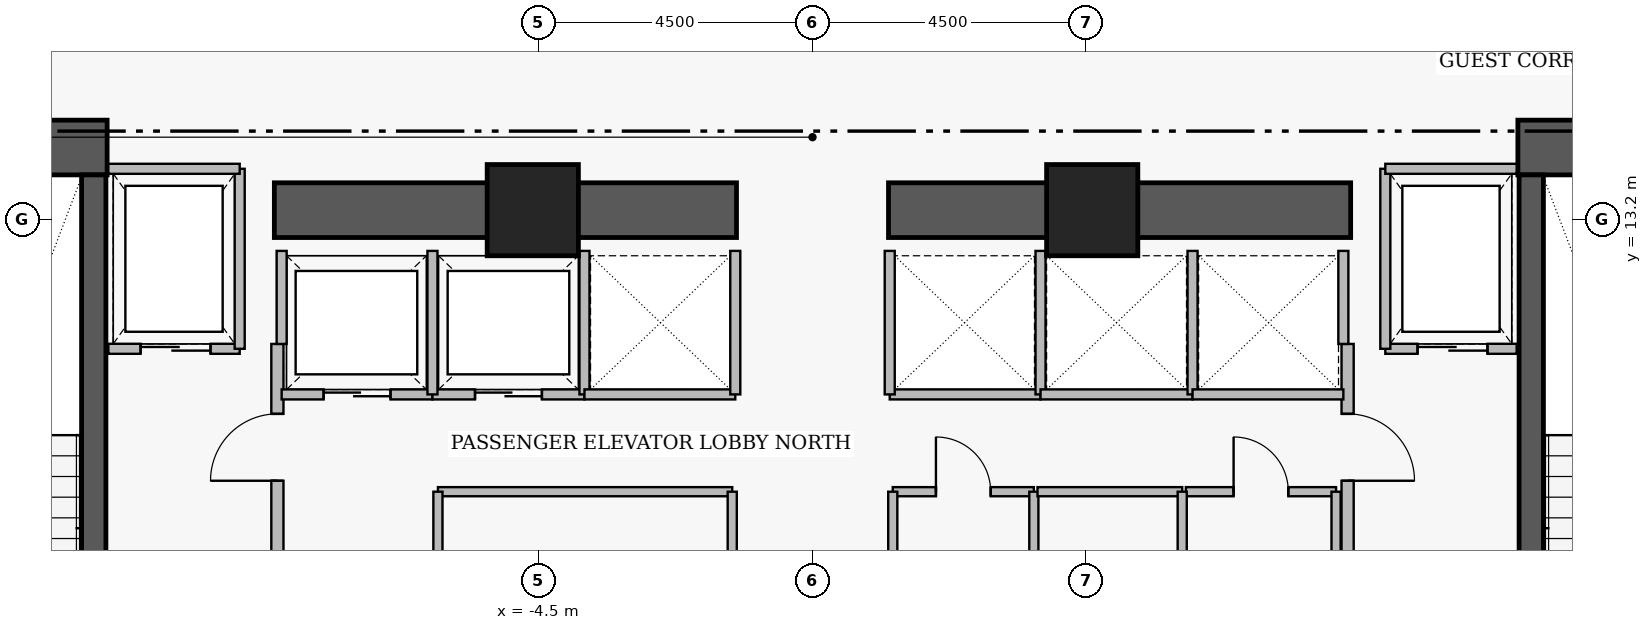
"""IFC4 building model, lengths in metres.
Left out: names, types, materials, properties, quantities, classifications, styles, units other than length and angle.
Written with IfcOpenShell. Run it as: python <this file> out.ifc"""

import sys

from ifc_helpers import new_model, si_unit, direction, frame, frame_2d, origin, origin_2d, place, context, subcontext, project, spatial, rectangle, extrude, element, fill, save


model = new_model("IFC4")
c1 = context("Model", 3, precision=1e-05, world=origin(), true_north=direction((0.0, 1.0)))
c2 = subcontext(c1, "Body", "Model", "MODEL_VIEW")
j1 = project(units=[si_unit("LENGTHUNIT", "METRE"), si_unit("PLANEANGLEUNIT", "RADIAN")], contexts=[c1])
p1 = place(None, origin())
s1 = spatial("IfcSite", under=j1, at=p1, CompositionType="ELEMENT")
p2 = place(p1, origin())
s2 = spatial("IfcBuilding", under=s1, at=p2, CompositionType="ELEMENT")
p3 = place(p2, frame((0.0, 0.0, 38.55)))
s3 = spatial("IfcBuildingStorey", under=s2, at=p3, CompositionType="ELEMENT", Elevation=38.55)
for number, where, z_axis, x_axis in (
    (1, (-16.31, 14.38, 0.0), (0.0, 0.0, 1.0), (1.0, 0.0, 0.0)),
    (2, (11.6, 14.38, 0.0), (0.0, 0.0, 1.0), (1.0, 0.0, 0.0)),
):
    element("IfcWall", number, at=place(p3, frame(where, z_axis=z_axis, x_axis=x_axis)), inside=s3, PredefinedType="SHEAR", context=c2, shape_type="SweptSolid", body=[
        extrude(rectangle(XDim=4.71, YDim=0.9, at=frame_2d((2.355, 0.0))), origin(), (0.0, 0.0, 1.0), 3.46),
    ])
for number, where, z_axis, x_axis in (
    (3, (-8.85, 13.35, 0.0), (0.0, 0.0, 1.0), (1.0, 0.0, 0.0)),
    (4, (1.25, 13.35, 0.0), (0.0, 0.0, 1.0), (1.0, 0.0, 0.0)),
):
    element("IfcWall", number, at=place(p3, frame(where, z_axis=z_axis, x_axis=x_axis)), inside=s3, PredefinedType="SHEAR", context=c2, shape_type="SweptSolid", body=[
        extrude(rectangle(XDim=7.6, YDim=0.9, at=frame_2d((3.8, 0.0))), origin(), (0.0, 0.0, 1.0), 3.43),
    ])
p4 = place(p3, frame((-11.82, 4.97, 0.0), z_axis=(0.0, 0.0, 1.0), x_axis=(0.0, 1.0, 0.0)))
e5 = element("IfcWall", 5, at=p4, inside=s3, PredefinedType="SHEAR", context=c2, shape_type="SweptSolid", body=[
    extrude(rectangle(XDim=8.96, YDim=0.4, at=frame_2d((4.48, 0.0))), origin(), (0.0, 0.0, 1.0), 3.46),
])
p5 = place(p4, frame((0.31, 0.0, 0.0)))
e6 = element("IfcOpeningElement", 6, at=p5, cuts=e5, PredefinedType="OPENING", context=c2, shape_type="SweptSolid", body=[
    extrude(rectangle(XDim=1.12, YDim=2.22, at=frame_2d((0.56, 1.11))), frame((0.0, 0.21, 0.0), z_axis=(0.0, -1.0, 0.0), x_axis=(1.0, 0.0, 0.0)), (0.0, 0.0, 1.0), 0.42),
])
p6 = place(p3, frame((11.82, 13.93, 0.0), z_axis=(0.0, 0.0, 1.0), x_axis=(0.0, -1.0, 0.0)))
e7 = element("IfcWall", 7, at=p6, inside=s3, PredefinedType="SHEAR", context=c2, shape_type="SweptSolid", body=[
    extrude(rectangle(XDim=8.96, YDim=0.4, at=frame_2d((4.48, 0.0))), origin(), (0.0, 0.0, 1.0), 3.46),
])
p7 = place(p6, frame((7.53, 0.0, 0.0)))
e8 = element("IfcOpeningElement", 8, at=p7, cuts=e7, PredefinedType="OPENING", context=c2, shape_type="SweptSolid", body=[
    extrude(rectangle(XDim=1.12, YDim=2.22, at=frame_2d((0.56, 1.11))), frame((0.0, 0.21, 0.0), z_axis=(0.0, -1.0, 0.0), x_axis=(1.0, 0.0, 0.0)), (0.0, 0.0, 1.0), 0.42),
])
for number, where, z_axis, x_axis in (
    (9, (-4.6, 13.35, 0.0), (0.0, 0.0, 1.0), (1.0, 0.0, 0.0)),
    (10, (4.6, 13.35, 0.0), (0.0, 0.0, 1.0), (1.0, 0.0, 0.0)),
):
    element("IfcColumn", number, at=place(p3, frame(where, z_axis=z_axis, x_axis=x_axis)), inside=s3, PredefinedType="COLUMN", context=c2, shape_type="SweptSolid", body=[
        extrude(rectangle(XDim=1.5, YDim=1.5, at=origin_2d()), origin(), (0.0, 0.0, 1.0), 3.65),
    ])
p8 = place(p3, frame((-8.8, 5.05, 0.0), z_axis=(0.0, 0.0, 1.0), x_axis=(0.0, 1.0, 0.0)))
e11 = element("IfcWall", 11, at=p8, inside=s3, PredefinedType="PARTITIONING", context=c2, shape_type="SweptSolid", body=[
    extrude(rectangle(XDim=6.1, YDim=0.2, at=frame_2d((3.05, 0.0))), origin(), (0.0, 0.0, 1.0), 3.43),
])
p9 = place(p8, frame((0.25, 0.0, 0.0)))
e12 = element("IfcOpeningElement", 12, at=p9, cuts=e11, PredefinedType="OPENING", context=c2, shape_type="SweptSolid", body=[
    extrude(rectangle(XDim=1.1, YDim=2.2, at=frame_2d((0.55, 1.1))), frame((0.0, 0.11, 0.0), z_axis=(0.0, -1.0, 0.0), x_axis=(1.0, 0.0, 0.0)), (0.0, 0.0, 1.0), 0.22),
])
p10 = place(p8, frame((3.85, 0.0, 0.0)))
e13 = element("IfcOpeningElement", 13, at=p10, cuts=e11, PredefinedType="OPENING", context=c2, shape_type="SweptSolid", body=[
    extrude(rectangle(XDim=1.1, YDim=2.2, at=frame_2d((0.55, 1.1))), frame((0.0, 0.11, 0.0), z_axis=(0.0, -1.0, 0.0), x_axis=(1.0, 0.0, 0.0)), (0.0, 0.0, 1.0), 0.22),
])
p11 = place(p3, frame((8.8, 11.15, 0.0), z_axis=(0.0, 0.0, 1.0), x_axis=(0.0, -1.0, 0.0)))
e14 = element("IfcWall", 14, at=p11, inside=s3, PredefinedType="PARTITIONING", context=c2, shape_type="SweptSolid", body=[
    extrude(rectangle(XDim=6.1, YDim=0.2, at=frame_2d((3.05, 0.0))), origin(), (0.0, 0.0, 1.0), 3.43),
])
p12 = place(p11, frame((1.15, 0.0, 0.0)))
e15 = element("IfcOpeningElement", 15, at=p12, cuts=e14, PredefinedType="OPENING", context=c2, shape_type="SweptSolid", body=[
    extrude(rectangle(XDim=1.1, YDim=2.2, at=frame_2d((0.55, 1.1))), frame((0.0, 0.11, 0.0), z_axis=(0.0, -1.0, 0.0), x_axis=(1.0, 0.0, 0.0)), (0.0, 0.0, 1.0), 0.22),
])
p13 = place(p11, frame((4.75, 0.0, 0.0)))
e16 = element("IfcOpeningElement", 16, at=p13, cuts=e14, PredefinedType="OPENING", context=c2, shape_type="SweptSolid", body=[
    extrude(rectangle(XDim=1.1, YDim=2.2, at=frame_2d((0.55, 1.1))), frame((0.0, 0.11, 0.0), z_axis=(0.0, -1.0, 0.0), x_axis=(1.0, 0.0, 0.0)), (0.0, 0.0, 1.0), 0.22),
])
p14 = place(p3, frame((-11.58, 11.07, 0.0), z_axis=(0.0, 0.0, 1.0), x_axis=(1.0, 0.0, 0.0)))
e17 = element("IfcWall", 17, at=p14, inside=s3, PredefinedType="PARTITIONING", context=c2, shape_type="SweptSolid", body=[
    extrude(rectangle(XDim=2.16, YDim=0.165, at=frame_2d((1.08, 0.0))), origin(), (0.0, 0.0, 1.0), 3.43),
])
p15 = place(p14, frame((0.53, 0.0, 0.0)))
e18 = element("IfcOpeningElement", 18, at=p15, cuts=e17, PredefinedType="OPENING", context=c2, shape_type="SweptSolid", body=[
    extrude(rectangle(XDim=1.15, YDim=2.25, at=frame_2d((0.575, 1.125))), frame((0.0, 0.093, 0.0), z_axis=(0.0, -1.0, 0.0), x_axis=(1.0, 0.0, 0.0)), (0.0, 0.0, 1.0), 0.185),
])
p16 = place(p3, frame((9.42, 11.07, 0.0), z_axis=(0.0, 0.0, 1.0), x_axis=(1.0, 0.0, 0.0)))
e19 = element("IfcWall", 19, at=p16, inside=s3, PredefinedType="PARTITIONING", context=c2, shape_type="SweptSolid", body=[
    extrude(rectangle(XDim=2.16, YDim=0.165, at=frame_2d((1.08, 0.0))), origin(), (0.0, 0.0, 1.0), 3.43),
])
p17 = place(p16, frame((0.53, 0.0, 0.0)))
e20 = element("IfcOpeningElement", 20, at=p17, cuts=e19, PredefinedType="OPENING", context=c2, shape_type="SweptSolid", body=[
    extrude(rectangle(XDim=1.15, YDim=2.25, at=frame_2d((0.575, 1.125))), frame((0.0, 0.093, 0.0), z_axis=(0.0, -1.0, 0.0), x_axis=(1.0, 0.0, 0.0)), (0.0, 0.0, 1.0), 0.185),
])
p18 = place(p3, frame((-8.73, 10.32, 0.0), z_axis=(0.0, 0.0, 1.0), x_axis=(1.0, 0.0, 0.0)))
e21 = element("IfcWall", 21, at=p18, inside=s3, PredefinedType="PARTITIONING", context=c2, shape_type="SweptSolid", body=[
    extrude(rectangle(XDim=2.48, YDim=0.165, at=frame_2d((1.24, 0.0))), origin(), (0.0, 0.0, 1.0), 3.43),
])
p19 = place(p18, frame((0.69, 0.0, 0.0)))
e22 = element("IfcOpeningElement", 22, at=p19, cuts=e21, PredefinedType="OPENING", context=c2, shape_type="SweptSolid", body=[
    extrude(rectangle(XDim=1.1, YDim=2.25, at=frame_2d((0.55, 1.125))), frame((0.0, 0.093, 0.0), z_axis=(0.0, -1.0, 0.0), x_axis=(1.0, 0.0, 0.0)), (0.0, 0.0, 1.0), 0.185),
])
p20 = place(p3, frame((-6.25, 10.32, 0.0), z_axis=(0.0, 0.0, 1.0), x_axis=(1.0, 0.0, 0.0)))
e23 = element("IfcWall", 23, at=p20, inside=s3, PredefinedType="PARTITIONING", context=c2, shape_type="SweptSolid", body=[
    extrude(rectangle(XDim=2.5, YDim=0.165, at=frame_2d((1.25, 0.0))), origin(), (0.0, 0.0, 1.0), 3.43),
])
p21 = place(p20, frame((0.7, 0.0, 0.0)))
e24 = element("IfcOpeningElement", 24, at=p21, cuts=e23, PredefinedType="OPENING", context=c2, shape_type="SweptSolid", body=[
    extrude(rectangle(XDim=1.1, YDim=2.25, at=frame_2d((0.55, 1.125))), frame((0.0, 0.093, 0.0), z_axis=(0.0, -1.0, 0.0), x_axis=(1.0, 0.0, 0.0)), (0.0, 0.0, 1.0), 0.185),
])
p22 = place(p3, frame((1.32, 8.72, 0.0), z_axis=(0.0, 0.0, 1.0), x_axis=(1.0, 0.0, 0.0)))
e25 = element("IfcWall", 25, at=p22, inside=s3, PredefinedType="PARTITIONING", context=c2, shape_type="SweptSolid", body=[
    extrude(rectangle(XDim=2.32, YDim=0.15, at=frame_2d((1.16, 0.0))), origin(), (0.0, 0.0, 1.0), 3.43),
])
p23 = place(p22, frame((0.71, 0.0, 0.0)))
e26 = element("IfcOpeningElement", 26, at=p23, cuts=e25, PredefinedType="OPENING", context=c2, shape_type="SweptSolid", body=[
    extrude(rectangle(XDim=0.9, YDim=2.15, at=frame_2d((0.45, 1.075))), frame((0.0, 0.085, 0.0), z_axis=(0.0, -1.0, 0.0), x_axis=(1.0, 0.0, 0.0)), (0.0, 0.0, 1.0), 0.17),
])
p24 = place(p3, frame((6.14, 8.72, 0.0), z_axis=(0.0, 0.0, 1.0), x_axis=(1.0, 0.0, 0.0)))
e27 = element("IfcWall", 27, at=p24, inside=s3, PredefinedType="PARTITIONING", context=c2, shape_type="SweptSolid", body=[
    extrude(rectangle(XDim=2.47, YDim=0.15, at=frame_2d((1.235, 0.0))), origin(), (0.0, 0.0, 1.0), 3.43),
])
p25 = place(p24, frame((0.785, 0.0, 0.0)))
e28 = element("IfcOpeningElement", 28, at=p25, cuts=e27, PredefinedType="OPENING", context=c2, shape_type="SweptSolid", body=[
    extrude(rectangle(XDim=0.9, YDim=2.15, at=frame_2d((0.45, 1.075))), frame((0.0, 0.085, 0.0), z_axis=(0.0, -1.0, 0.0), x_axis=(1.0, 0.0, 0.0)), (0.0, 0.0, 1.0), 0.17),
])
p26 = place(p3, frame((-9.42, 11.07, 0.0), z_axis=(0.0, 0.0, 1.0), x_axis=(0.0, 1.0, 0.0)))
e29 = element("IfcWall", 29, at=p26, inside=s3, PredefinedType="PARTITIONING", context=c2, shape_type="SweptSolid", body=[
    extrude(rectangle(XDim=2.96, YDim=0.165, at=frame_2d((1.48, 0.0))), origin(), (0.0, 0.0, 1.0), 3.43),
])
p27 = place(p3, frame((-11.58, 14.03, 0.0), z_axis=(0.0, 0.0, 1.0), x_axis=(1.0, 0.0, 0.0)))
e30 = element("IfcWall", 30, at=p27, inside=s3, PredefinedType="PARTITIONING", context=c2, shape_type="SweptSolid", body=[
    extrude(rectangle(XDim=2.16, YDim=0.165, at=frame_2d((1.08, 0.0))), origin(), (0.0, 0.0, 1.0), 3.43),
])
p28 = place(p3, frame((9.42, 11.07, 0.0), z_axis=(0.0, 0.0, 1.0), x_axis=(0.0, 1.0, 0.0)))
e31 = element("IfcWall", 31, at=p28, inside=s3, PredefinedType="PARTITIONING", context=c2, shape_type="SweptSolid", body=[
    extrude(rectangle(XDim=2.96, YDim=0.165, at=frame_2d((1.48, 0.0))), origin(), (0.0, 0.0, 1.0), 3.43),
])
p29 = place(p3, frame((9.42, 14.03, 0.0), z_axis=(0.0, 0.0, 1.0), x_axis=(1.0, 0.0, 0.0)))
e32 = element("IfcWall", 32, at=p29, inside=s3, PredefinedType="PARTITIONING", context=c2, shape_type="SweptSolid", body=[
    extrude(rectangle(XDim=2.16, YDim=0.165, at=frame_2d((1.08, 0.0))), origin(), (0.0, 0.0, 1.0), 3.43),
])
p30 = place(p3, frame((-8.73, 11.15, 0.0), z_axis=(0.0, 0.0, 1.0), x_axis=(0.0, 1.0, 0.0)))
e33 = element("IfcWall", 33, at=p30, inside=s3, PredefinedType="PARTITIONING", context=c2, shape_type="SweptSolid", body=[
    extrude(rectangle(XDim=1.53, YDim=0.165, at=frame_2d((0.765, 0.0))), origin(), (0.0, 0.0, 1.0), 3.43),
])
for number, where, z_axis, x_axis in (
    (34, (-6.25, 10.32, 0.0), (0.0, 0.0, 1.0), (0.0, 1.0, 0.0)),
    (35, (-3.75, 10.32, 0.0), (0.0, 0.0, 1.0), (0.0, 1.0, 0.0)),
):
    element("IfcWall", number, at=place(p3, frame(where, z_axis=z_axis, x_axis=x_axis)), inside=s3, PredefinedType="PARTITIONING", context=c2, shape_type="SweptSolid", body=[
        extrude(rectangle(XDim=2.36, YDim=0.165, at=frame_2d((1.18, 0.0))), origin(), (0.0, 0.0, 1.0), 3.43),
    ])
p31 = place(p3, frame((-3.75, 10.32, 0.0), z_axis=(0.0, 0.0, 1.0), x_axis=(1.0, 0.0, 0.0)))
e36 = element("IfcWall", 36, at=p31, inside=s3, PredefinedType="PARTITIONING", context=c2, shape_type="SweptSolid", body=[
    extrude(rectangle(XDim=2.48, YDim=0.165, at=frame_2d((1.24, 0.0))), origin(), (0.0, 0.0, 1.0), 3.43),
])
p32 = place(p3, frame((-1.27, 10.32, 0.0), z_axis=(0.0, 0.0, 1.0), x_axis=(0.0, 1.0, 0.0)))
e37 = element("IfcWall", 37, at=p32, inside=s3, PredefinedType="PARTITIONING", context=c2, shape_type="SweptSolid", body=[
    extrude(rectangle(XDim=2.36, YDim=0.165, at=frame_2d((1.18, 0.0))), origin(), (0.0, 0.0, 1.0), 3.43),
])
p33 = place(p3, frame((1.27, 10.32, 0.0), z_axis=(0.0, 0.0, 1.0), x_axis=(1.0, 0.0, 0.0)))
e38 = element("IfcWall", 38, at=p33, inside=s3, PredefinedType="PARTITIONING", context=c2, shape_type="SweptSolid", body=[
    extrude(rectangle(XDim=2.48, YDim=0.165, at=frame_2d((1.24, 0.0))), origin(), (0.0, 0.0, 1.0), 3.43),
])
for number, where, z_axis, x_axis in (
    (39, (1.27, 10.32, 0.0), (0.0, 0.0, 1.0), (0.0, 1.0, 0.0)),
    (40, (3.75, 10.32, 0.0), (0.0, 0.0, 1.0), (0.0, 1.0, 0.0)),
):
    element("IfcWall", number, at=place(p3, frame(where, z_axis=z_axis, x_axis=x_axis)), inside=s3, PredefinedType="PARTITIONING", context=c2, shape_type="SweptSolid", body=[
        extrude(rectangle(XDim=2.36, YDim=0.165, at=frame_2d((1.18, 0.0))), origin(), (0.0, 0.0, 1.0), 3.43),
    ])
p34 = place(p3, frame((3.75, 10.32, 0.0), z_axis=(0.0, 0.0, 1.0), x_axis=(1.0, 0.0, 0.0)))
e41 = element("IfcWall", 41, at=p34, inside=s3, PredefinedType="PARTITIONING", context=c2, shape_type="SweptSolid", body=[
    extrude(rectangle(XDim=2.5, YDim=0.165, at=frame_2d((1.25, 0.0))), origin(), (0.0, 0.0, 1.0), 3.43),
])
p35 = place(p3, frame((6.25, 10.32, 0.0), z_axis=(0.0, 0.0, 1.0), x_axis=(0.0, 1.0, 0.0)))
e42 = element("IfcWall", 42, at=p35, inside=s3, PredefinedType="PARTITIONING", context=c2, shape_type="SweptSolid", body=[
    extrude(rectangle(XDim=2.36, YDim=0.165, at=frame_2d((1.18, 0.0))), origin(), (0.0, 0.0, 1.0), 3.43),
])
p36 = place(p3, frame((6.25, 10.32, 0.0), z_axis=(0.0, 0.0, 1.0), x_axis=(1.0, 0.0, 0.0)))
e43 = element("IfcWall", 43, at=p36, inside=s3, PredefinedType="PARTITIONING", context=c2, shape_type="SweptSolid", body=[
    extrude(rectangle(XDim=2.48, YDim=0.165, at=frame_2d((1.24, 0.0))), origin(), (0.0, 0.0, 1.0), 3.43),
])
p37 = place(p3, frame((8.73, 11.15, 0.0), z_axis=(0.0, 0.0, 1.0), x_axis=(0.0, 1.0, 0.0)))
e44 = element("IfcWall", 44, at=p37, inside=s3, PredefinedType="PARTITIONING", context=c2, shape_type="SweptSolid", body=[
    extrude(rectangle(XDim=1.53, YDim=0.165, at=frame_2d((0.765, 0.0))), origin(), (0.0, 0.0, 1.0), 3.43),
])
p38 = place(p3, frame((-6.16, 8.72, 0.0), z_axis=(0.0, 0.0, 1.0), x_axis=(1.0, 0.0, 0.0)))
e45 = element("IfcWall", 45, at=p38, inside=s3, PredefinedType="PARTITIONING", context=c2, shape_type="SweptSolid", body=[
    extrude(rectangle(XDim=4.84, YDim=0.15, at=frame_2d((2.42, 0.0))), origin(), (0.0, 0.0, 1.0), 3.43),
])
for number, where, z_axis, x_axis in (
    (46, (-6.16, 6.48, 0.0), (0.0, 0.0, 1.0), (0.0, 1.0, 0.0)),
    (47, (-1.32, 6.48, 0.0), (0.0, 0.0, 1.0), (0.0, 1.0, 0.0)),
    (48, (1.32, 6.48, 0.0), (0.0, 0.0, 1.0), (0.0, 1.0, 0.0)),
    (49, (3.64, 6.48, 0.0), (0.0, 0.0, 1.0), (0.0, 1.0, 0.0)),
):
    element("IfcWall", number, at=place(p3, frame(where, z_axis=z_axis, x_axis=x_axis)), inside=s3, PredefinedType="PARTITIONING", context=c2, shape_type="SweptSolid", body=[
        extrude(rectangle(XDim=2.24, YDim=0.15, at=frame_2d((1.12, 0.0))), origin(), (0.0, 0.0, 1.0), 3.43),
    ])
p39 = place(p3, frame((3.7, 8.72, 0.0), z_axis=(0.0, 0.0, 1.0), x_axis=(1.0, 0.0, 0.0)))
e50 = element("IfcWall", 50, at=p39, inside=s3, PredefinedType="PARTITIONING", context=c2, shape_type="SweptSolid", body=[
    extrude(rectangle(XDim=2.38, YDim=0.15, at=frame_2d((1.19, 0.0))), origin(), (0.0, 0.0, 1.0), 3.43),
])
for number, where, z_axis, x_axis in (
    (51, (6.08, 6.48, 0.0), (0.0, 0.0, 1.0), (0.0, 1.0, 0.0)),
    (52, (8.61, 6.48, 0.0), (0.0, 0.0, 1.0), (0.0, 1.0, 0.0)),
):
    element("IfcWall", number, at=place(p3, frame(where, z_axis=z_axis, x_axis=x_axis)), inside=s3, PredefinedType="PARTITIONING", context=c2, shape_type="SweptSolid", body=[
        extrude(rectangle(XDim=2.24, YDim=0.15, at=frame_2d((1.12, 0.0))), origin(), (0.0, 0.0, 1.0), 3.43),
    ])
p40 = place(p10, origin())
e53 = element("IfcDoor", 53, at=p40, inside=s3, OperationType="SINGLE_SWING_LEFT", PredefinedType="DOOR", context=c2, shape_type="SweptSolid", body=[
    extrude(rectangle(XDim=1.1, YDim=2.2, at=frame_2d((0.55, 1.1))), frame((0.0, 0.025, 0.0), z_axis=(0.0, -1.0, 0.0), x_axis=(1.0, 0.0, 0.0)), (0.0, 0.0, 1.0), 0.05),
])
fill(e13, e53)
p41 = place(p12, origin())
e54 = element("IfcDoor", 54, at=p41, inside=s3, OperationType="SINGLE_SWING_RIGHT", PredefinedType="DOOR", context=c2, shape_type="SweptSolid", body=[
    extrude(rectangle(XDim=1.1, YDim=2.2, at=frame_2d((0.55, 1.1))), frame((0.0, 0.025, 0.0), z_axis=(0.0, -1.0, 0.0), x_axis=(1.0, 0.0, 0.0)), (0.0, 0.0, 1.0), 0.05),
])
fill(e15, e54)
p42 = place(p15, origin())
e55 = element("IfcDoor", 55, at=p42, inside=s3, OperationType="SLIDING_TO_LEFT", PredefinedType="DOOR", context=c2, shape_type="SweptSolid", body=[
    extrude(rectangle(XDim=1.15, YDim=2.25, at=frame_2d((0.575, 1.125))), frame((0.0, 0.025, 0.0), z_axis=(0.0, -1.0, 0.0), x_axis=(1.0, 0.0, 0.0)), (0.0, 0.0, 1.0), 0.05),
])
fill(e18, e55)
p43 = place(p17, origin())
e56 = element("IfcDoor", 56, at=p43, inside=s3, OperationType="SLIDING_TO_LEFT", PredefinedType="DOOR", context=c2, shape_type="SweptSolid", body=[
    extrude(rectangle(XDim=1.15, YDim=2.25, at=frame_2d((0.575, 1.125))), frame((0.0, 0.025, 0.0), z_axis=(0.0, -1.0, 0.0), x_axis=(1.0, 0.0, 0.0)), (0.0, 0.0, 1.0), 0.05),
])
fill(e20, e56)
p44 = place(p19, origin())
e57 = element("IfcDoor", 57, at=p44, inside=s3, OperationType="SLIDING_TO_LEFT", PredefinedType="DOOR", context=c2, shape_type="SweptSolid", body=[
    extrude(rectangle(XDim=1.1, YDim=2.25, at=frame_2d((0.55, 1.125))), frame((0.0, 0.025, 0.0), z_axis=(0.0, -1.0, 0.0), x_axis=(1.0, 0.0, 0.0)), (0.0, 0.0, 1.0), 0.05),
])
fill(e22, e57)
p45 = place(p21, origin())
e58 = element("IfcDoor", 58, at=p45, inside=s3, OperationType="SLIDING_TO_LEFT", PredefinedType="DOOR", context=c2, shape_type="SweptSolid", body=[
    extrude(rectangle(XDim=1.1, YDim=2.25, at=frame_2d((0.55, 1.125))), frame((0.0, 0.025, 0.0), z_axis=(0.0, -1.0, 0.0), x_axis=(1.0, 0.0, 0.0)), (0.0, 0.0, 1.0), 0.05),
])
fill(e24, e58)
p46 = place(p23, origin())
e59 = element("IfcDoor", 59, at=p46, inside=s3, OperationType="SINGLE_SWING_LEFT", PredefinedType="DOOR", context=c2, shape_type="SweptSolid", body=[
    extrude(rectangle(XDim=0.9, YDim=2.15, at=frame_2d((0.45, 1.075))), frame((0.0, 0.025, 0.0), z_axis=(0.0, -1.0, 0.0), x_axis=(1.0, 0.0, 0.0)), (0.0, 0.0, 1.0), 0.05),
])
fill(e26, e59)
p47 = place(p25, origin())
e60 = element("IfcDoor", 60, at=p47, inside=s3, OperationType="SINGLE_SWING_LEFT", PredefinedType="DOOR", context=c2, shape_type="SweptSolid", body=[
    extrude(rectangle(XDim=0.9, YDim=2.15, at=frame_2d((0.45, 1.075))), frame((0.0, 0.025, 0.0), z_axis=(0.0, -1.0, 0.0), x_axis=(1.0, 0.0, 0.0)), (0.0, 0.0, 1.0), 0.05),
])
fill(e28, e60)
save(model, sys.argv[1])
